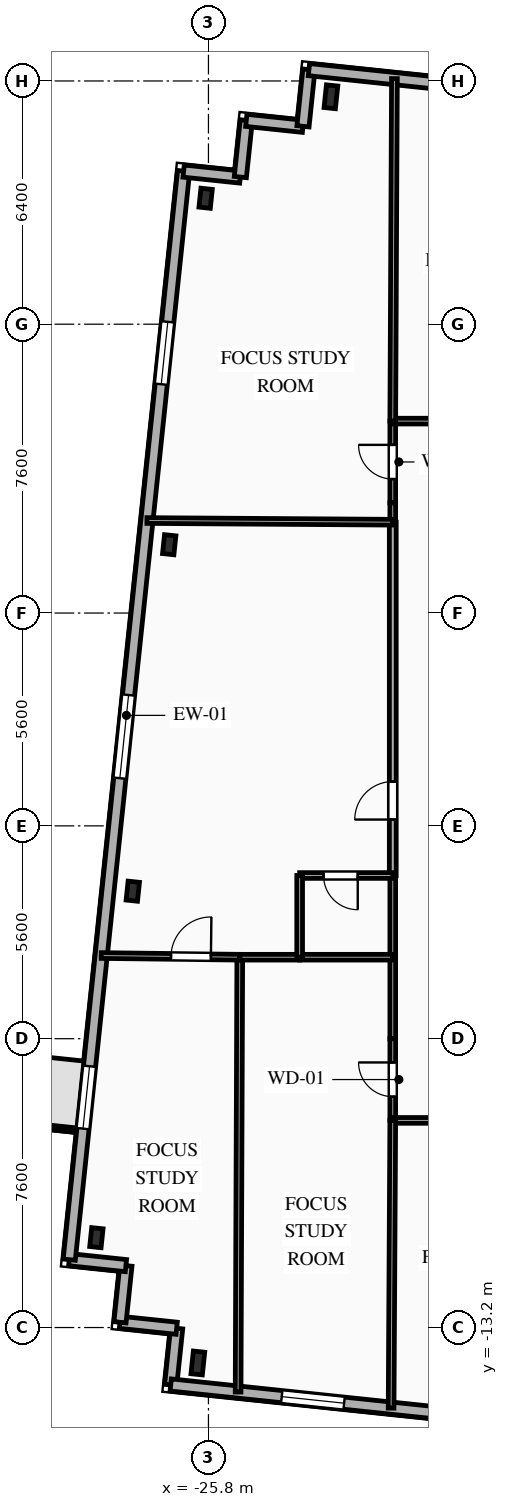
"""IFC4 building model, lengths in metres.
Left out: names, types, materials, properties, quantities, classifications, styles, units other than length and angle.
Written with IfcOpenShell. Run it as: python <this file> out.ifc"""

import sys

from ifc_helpers import new_model, si_unit, direction, frame, frame_2d, origin, origin_2d, place, context, subcontext, project, spatial, rectangle, i_section, extrude, element, fill, save


model = new_model("IFC4")
c1 = context("Model", 3, precision=1e-05, world=origin(), true_north=direction((0.0, 1.0)))
c2 = subcontext(c1, "Body", "Model", "MODEL_VIEW")
j1 = project(units=[si_unit("LENGTHUNIT", "METRE"), si_unit("PLANEANGLEUNIT", "RADIAN")], contexts=[c1])
p1 = place(None, origin())
s1 = spatial("IfcSite", under=j1, at=p1, CompositionType="ELEMENT")
p2 = place(p1, origin())
s2 = spatial("IfcBuilding", under=s1, at=p2, CompositionType="ELEMENT")
p3 = place(p2, frame((0.0, 0.0, 216.5)))
s3 = spatial("IfcBuildingStorey", under=s2, at=p3, CompositionType="ELEMENT", Elevation=216.5)
for number, where, z_axis, x_axis in (
    (1, (-26.079, -14.133, 0.0), (0.0, 0.0, 1.0), (0.995, -0.105, 0.0)),
    (2, (-22.577, 19.184, 0.0), (0.0, 0.0, 1.0), (0.995, -0.105, 0.0)),
):
    element("IfcColumn", number, at=place(p3, frame(where, z_axis=z_axis, x_axis=x_axis)), inside=s3, PredefinedType="COLUMN", context=c2, shape_type="SweptSolid", body=[
        extrude(i_section(OverallWidth=0.3, OverallDepth=0.6, WebThickness=0.015, FlangeThickness=0.03, FilletRadius=0.027, at=origin_2d()), origin(), (0.0, 0.0, 1.0), 3.35),
    ])
for number, where, z_axis, x_axis in (
    (3, (-25.875, 16.514, 0.0), (0.0, 0.0, 1.0), (0.995, -0.105, 0.0)),
    (4, (-26.833, 7.398, 0.0), (0.0, 0.0, 1.0), (0.995, -0.105, 0.0)),
    (5, (-27.791, -1.719, 0.0), (0.0, 0.0, 1.0), (0.995, -0.105, 0.0)),
    (6, (-28.749, -10.835, 0.0), (0.0, 0.0, 1.0), (0.995, -0.105, 0.0)),
):
    element("IfcColumn", number, at=place(p3, frame(where, z_axis=z_axis, x_axis=x_axis)), inside=s3, PredefinedType="COLUMN", context=c2, shape_type="SweptSolid", body=[
        extrude(i_section(OverallWidth=0.3, OverallDepth=0.5, WebThickness=0.014, FlangeThickness=0.028, FilletRadius=0.027, at=origin_2d()), origin(), (0.0, 0.0, 1.0), 3.35),
    ])
for number, where, z_axis, x_axis in (
    (7, (-26.793, -14.711, 0.0), (0.0, 0.0, 1.0), (0.104, 0.995, 0.0)),
    (8, (-26.637, -13.219, 0.0), (0.0, 0.0, 1.0), (-0.995, 0.104, 0.0)),
):
    element("IfcWall", number, at=place(p3, frame(where, z_axis=z_axis, x_axis=x_axis)), inside=s3, PredefinedType="SOLIDWALL", context=c2, shape_type="SweptSolid", body=[
        extrude(rectangle(XDim=1.5, YDim=0.32, at=frame_2d((0.75, 0.0))), origin(), (0.0, 0.0, 1.0), 3.04),
    ])
p4 = place(p3, frame((-28.128, -13.062, 0.0), z_axis=(0.0, 0.0, 1.0), x_axis=(0.104481464157, 0.994526834051, 0.0)))
e9 = element("IfcWall", 9, at=p4, inside=s3, PredefinedType="SOLIDWALL", context=c2, shape_type="SweptSolid", body=[
    extrude(rectangle(XDim=1.5, YDim=0.32, at=frame_2d((0.75, 0.0))), origin(), (0.0, 0.0, 1.0), 3.04),
])
p5 = place(p3, frame((-27.972, -11.571, 0.0), z_axis=(0.0, 0.0, 1.0), x_axis=(-0.994525057048, 0.104498377516, 0.0)))
e10 = element("IfcWall", 10, at=p5, inside=s3, PredefinedType="SOLIDWALL", context=c2, shape_type="SweptSolid", body=[
    extrude(rectangle(XDim=1.5, YDim=0.32, at=frame_2d((0.75, 0.0))), origin(), (0.0, 0.0, 1.0), 3.04),
])
p6 = place(p3, frame((-29.463, -11.414, 0.0), z_axis=(0.0, 0.0, 1.0), x_axis=(0.104530779244, 0.994521651947, 0.0)))
e11 = element("IfcWall", 11, at=p6, inside=s3, PredefinedType="SOLIDWALL", context=c2, shape_type="SweptSolid", body=[
    extrude(rectangle(XDim=28.8, YDim=0.32, at=frame_2d((14.4, 0.0))), origin(), (0.0, 0.0, 1.0), 3.04),
])
p7 = place(p6, frame((3.467, 0.0, 0.85)))
e12 = element("IfcOpeningElement", 12, at=p7, cuts=e11, PredefinedType="OPENING", context=c2, shape_type="SweptSolid", body=[
    extrude(rectangle(XDim=1.65, YDim=1.85, at=frame_2d((0.825, 0.925))), frame((0.0, 0.17, 0.0), z_axis=(0.0, -1.0, 0.0), x_axis=(1.0, 0.0, 0.0)), (0.0, 0.0, 1.0), 0.34),
])
p8 = place(p6, frame((12.738, 0.0, 0.85)))
e13 = element("IfcOpeningElement", 13, at=p8, cuts=e11, PredefinedType="OPENING", context=c2, shape_type="SweptSolid", body=[
    extrude(rectangle(XDim=2.2, YDim=1.85, at=frame_2d((1.1, 0.925))), frame((0.0, 0.17, 0.0), z_axis=(0.0, -1.0, 0.0), x_axis=(1.0, 0.0, 0.0)), (0.0, 0.0, 1.0), 0.34),
])
p9 = place(p6, frame((23.162, 0.0, 0.85)))
e14 = element("IfcOpeningElement", 14, at=p9, cuts=e11, PredefinedType="OPENING", context=c2, shape_type="SweptSolid", body=[
    extrude(rectangle(XDim=1.65, YDim=1.85, at=frame_2d((0.825, 0.925))), frame((0.0, 0.17, 0.0), z_axis=(0.0, -1.0, 0.0), x_axis=(1.0, 0.0, 0.0)), (0.0, 0.0, 1.0), 0.34),
])
p10 = place(p3, frame((-26.453, 17.229, 0.0), z_axis=(0.0, 0.0, 1.0), x_axis=(0.994508128223, -0.104659366031, 0.0)))
e15 = element("IfcWall", 15, at=p10, inside=s3, PredefinedType="SOLIDWALL", context=c2, shape_type="SweptSolid", body=[
    extrude(rectangle(XDim=1.5, YDim=0.32, at=frame_2d((0.75, 0.0))), origin(), (0.0, 0.0, 1.0), 3.04),
])
p11 = place(p3, frame((-24.961, 17.072, 0.0), z_axis=(0.0, 0.0, 1.0), x_axis=(0.104642427191, 0.994509910675, 0.0)))
e16 = element("IfcWall", 16, at=p11, inside=s3, PredefinedType="SOLIDWALL", context=c2, shape_type="SweptSolid", body=[
    extrude(rectangle(XDim=1.5, YDim=0.32, at=frame_2d((0.75, 0.0))), origin(), (0.0, 0.0, 1.0), 3.04),
])
p12 = place(p3, frame((-24.804, 18.563, 0.0), z_axis=(0.0, 0.0, 1.0), x_axis=(0.994508128223, -0.104659366031, 0.0)))
e17 = element("IfcWall", 17, at=p12, inside=s3, PredefinedType="SOLIDWALL", context=c2, shape_type="SweptSolid", body=[
    extrude(rectangle(XDim=1.5, YDim=0.32, at=frame_2d((0.75, 0.0))), origin(), (0.0, 0.0, 1.0), 3.04),
])
p13 = place(p3, frame((-23.312, 18.406, 0.0), z_axis=(0.0, 0.0, 1.0), x_axis=(0.104481464157, 0.994526834051, 0.0)))
e18 = element("IfcWall", 18, at=p13, inside=s3, PredefinedType="SOLIDWALL", context=c2, shape_type="SweptSolid", body=[
    extrude(rectangle(XDim=1.5, YDim=0.32, at=frame_2d((0.75, 0.0))), origin(), (0.0, 0.0, 1.0), 3.04),
])
p14 = place(p3, frame((-23.156, 19.898, 0.0), z_axis=(0.0, 0.0, 1.0), x_axis=(0.994522001802, -0.104527450613, 0.0)))
e19 = element("IfcWall", 19, at=p14, inside=s3, PredefinedType="SOLIDWALL", context=c2, shape_type="SweptSolid", body=[
    extrude(rectangle(XDim=45.8, YDim=0.32, at=frame_2d((22.9, 0.0))), origin(), (0.0, 0.0, 1.0), 3.04),
])
p15 = place(p14, frame((4.9, 0.0, 0.85)))
e20 = element("IfcOpeningElement", 20, at=p15, cuts=e19, PredefinedType="OPENING", context=c2, shape_type="SweptSolid", body=[
    extrude(rectangle(XDim=1.65, YDim=1.85, at=frame_2d((0.825, 0.925))), frame((0.0, 0.17, 0.0), z_axis=(0.0, -1.0, 0.0), x_axis=(1.0, 0.0, 0.0)), (0.0, 0.0, 1.0), 0.34),
])
p16 = place(p14, frame((11.706, 0.0, 0.85)))
e21 = element("IfcOpeningElement", 21, at=p16, cuts=e19, PredefinedType="OPENING", context=c2, shape_type="SweptSolid", body=[
    extrude(rectangle(XDim=1.65, YDim=1.85, at=frame_2d((0.825, 0.925))), frame((0.0, 0.17, 0.0), z_axis=(0.0, -1.0, 0.0), x_axis=(1.0, 0.0, 0.0)), (0.0, 0.0, 1.0), 0.34),
])
p17 = place(p14, frame((23.381, 0.0, 0.85)))
e22 = element("IfcOpeningElement", 22, at=p17, cuts=e19, PredefinedType="OPENING", context=c2, shape_type="SweptSolid", body=[
    extrude(rectangle(XDim=1.6, YDim=1.85, at=frame_2d((0.8, 0.925))), frame((0.0, 0.17, 0.0), z_axis=(0.0, -1.0, 0.0), x_axis=(1.0, 0.0, 0.0)), (0.0, 0.0, 1.0), 0.34),
])
p18 = place(p14, frame((34.628, 0.0, 0.85)))
e23 = element("IfcOpeningElement", 23, at=p18, cuts=e19, PredefinedType="OPENING", context=c2, shape_type="SweptSolid", body=[
    extrude(rectangle(XDim=1.65, YDim=1.85, at=frame_2d((0.825, 0.925))), frame((0.0, 0.17, 0.0), z_axis=(0.0, -1.0, 0.0), x_axis=(1.0, 0.0, 0.0)), (0.0, 0.0, 1.0), 0.34),
])
p19 = place(p3, frame((18.756, -19.498, 0.0), z_axis=(0.0, 0.0, 1.0), x_axis=(-0.994522060044, 0.104526896475, 0.0)))
e24 = element("IfcWall", 24, at=p19, inside=s3, PredefinedType="SOLIDWALL", context=c2, shape_type="SweptSolid", body=[
    extrude(rectangle(XDim=45.8, YDim=0.32, at=frame_2d((22.9, 0.0))), origin(), (0.0, 0.0, 1.0), 3.04),
])
p20 = place(p19, frame((1.657, 0.0, 0.85)))
e25 = element("IfcOpeningElement", 25, at=p20, cuts=e24, PredefinedType="OPENING", context=c2, shape_type="SweptSolid", body=[
    extrude(rectangle(XDim=1.65, YDim=1.85, at=frame_2d((0.825, 0.925))), frame((0.0, 0.17, 0.0), z_axis=(0.0, -1.0, 0.0), x_axis=(1.0, 0.0, 0.0)), (0.0, 0.0, 1.0), 0.34),
])
p21 = place(p19, frame((6.907, 0.0, 0.85)))
e26 = element("IfcOpeningElement", 26, at=p21, cuts=e24, PredefinedType="OPENING", context=c2, shape_type="SweptSolid", body=[
    extrude(rectangle(XDim=2.2, YDim=1.85, at=frame_2d((1.1, 0.925))), frame((0.0, 0.17, 0.0), z_axis=(0.0, -1.0, 0.0), x_axis=(1.0, 0.0, 0.0)), (0.0, 0.0, 1.0), 0.34),
])
p22 = place(p19, frame((13.953, 0.0, 0.85)))
e27 = element("IfcOpeningElement", 27, at=p22, cuts=e24, PredefinedType="OPENING", context=c2, shape_type="SweptSolid", body=[
    extrude(rectangle(XDim=2.2, YDim=1.85, at=frame_2d((1.1, 0.925))), frame((0.0, 0.17, 0.0), z_axis=(0.0, -1.0, 0.0), x_axis=(1.0, 0.0, 0.0)), (0.0, 0.0, 1.0), 0.34),
])
p23 = place(p19, frame((20.959, 0.0, 0.85)))
e28 = element("IfcOpeningElement", 28, at=p23, cuts=e24, PredefinedType="OPENING", context=c2, shape_type="SweptSolid", body=[
    extrude(rectangle(XDim=2.2, YDim=1.85, at=frame_2d((1.1, 0.925))), frame((0.0, 0.17, 0.0), z_axis=(0.0, -1.0, 0.0), x_axis=(1.0, 0.0, 0.0)), (0.0, 0.0, 1.0), 0.34),
])
p24 = place(p19, frame((27.965, 0.0, 0.85)))
e29 = element("IfcOpeningElement", 29, at=p24, cuts=e24, PredefinedType="OPENING", context=c2, shape_type="SweptSolid", body=[
    extrude(rectangle(XDim=2.2, YDim=1.85, at=frame_2d((1.1, 0.925))), frame((0.0, 0.17, 0.0), z_axis=(0.0, -1.0, 0.0), x_axis=(1.0, 0.0, 0.0)), (0.0, 0.0, 1.0), 0.34),
])
p25 = place(p19, frame((35.487, 0.0, 0.85)))
e30 = element("IfcOpeningElement", 30, at=p25, cuts=e24, PredefinedType="OPENING", context=c2, shape_type="SweptSolid", body=[
    extrude(rectangle(XDim=1.65, YDim=1.85, at=frame_2d((0.825, 0.925))), frame((0.0, 0.17, 0.0), z_axis=(0.0, -1.0, 0.0), x_axis=(1.0, 0.0, 0.0)), (0.0, 0.0, 1.0), 0.34),
])
p26 = place(p19, frame((41.212, 0.0, 0.85)))
e31 = element("IfcOpeningElement", 31, at=p26, cuts=e24, PredefinedType="OPENING", context=c2, shape_type="SweptSolid", body=[
    extrude(rectangle(XDim=1.65, YDim=1.85, at=frame_2d((0.825, 0.925))), frame((0.0, 0.17, 0.0), z_axis=(0.0, -1.0, 0.0), x_axis=(1.0, 0.0, 0.0)), (0.0, 0.0, 1.0), 0.34),
])
p27 = place(p3, frame((-20.95, 8.5, 0.0), z_axis=(0.0, 0.0, 1.0), x_axis=(0.0, 1.0, 0.0)))
e32 = element("IfcWall", 32, at=p27, inside=s3, PredefinedType="PARTITIONING", context=c2, shape_type="SweptSolid", body=[
    extrude(rectangle(XDim=2.15, YDim=0.15, at=frame_2d((1.075, 0.0))), origin(), (0.0, 0.0, 1.0), 3.04),
])
p28 = place(p27, frame((0.625, 0.0, 0.0)))
e33 = element("IfcOpeningElement", 33, at=p28, cuts=e32, PredefinedType="OPENING", context=c2, shape_type="SweptSolid", body=[
    extrude(rectangle(XDim=0.9, YDim=2.1, at=frame_2d((0.45, 1.05))), frame((0.0, 0.085, 0.0), z_axis=(0.0, -1.0, 0.0), x_axis=(1.0, 0.0, 0.0)), (0.0, 0.0, 1.0), 0.17),
])
p29 = place(p3, frame((-20.95, 10.65, 0.0), z_axis=(0.0, 0.0, 1.0), x_axis=(1.0, 0.0, 0.0)))
e34 = element("IfcWall", 34, at=p29, inside=s3, PredefinedType="PARTITIONING", context=c2, shape_type="SweptSolid", body=[
    extrude(rectangle(XDim=6.783, YDim=0.15, at=frame_2d((3.392, 0.0))), origin(), (0.0, 0.0, 1.0), 3.04),
])
p30 = place(p29, frame((4.582, 0.0, 0.0)))
e35 = element("IfcOpeningElement", 35, at=p30, cuts=e34, PredefinedType="OPENING", context=c2, shape_type="SweptSolid", body=[
    extrude(rectangle(XDim=1.05, YDim=2.15, at=frame_2d((0.525, 1.075))), frame((0.0, 0.085, 0.0), z_axis=(0.0, -1.0, 0.0), x_axis=(1.0, 0.0, 0.0)), (0.0, 0.0, 1.0), 0.17),
])
p31 = place(p3, frame((-20.95, -7.75, 0.0), z_axis=(0.0, 0.0, 1.0), x_axis=(0.0, 1.0, 0.0)))
e36 = element("IfcWall", 36, at=p31, inside=s3, PredefinedType="PARTITIONING", context=c2, shape_type="SweptSolid", body=[
    extrude(rectangle(XDim=2.15, YDim=0.15, at=frame_2d((1.075, 0.0))), origin(), (0.0, 0.0, 1.0), 3.04),
])
p32 = place(p31, frame((0.625, 0.0, 0.0)))
e37 = element("IfcOpeningElement", 37, at=p32, cuts=e36, PredefinedType="OPENING", context=c2, shape_type="SweptSolid", body=[
    extrude(rectangle(XDim=0.9, YDim=2.1, at=frame_2d((0.45, 1.05))), frame((0.0, 0.085, 0.0), z_axis=(0.0, -1.0, 0.0), x_axis=(1.0, 0.0, 0.0)), (0.0, 0.0, 1.0), 0.17),
])
p33 = place(p3, frame((-13.567, -7.75, 0.0), z_axis=(0.0, 0.0, 1.0), x_axis=(-1.0, 0.0, 0.0)))
e38 = element("IfcWall", 38, at=p33, inside=s3, PredefinedType="PARTITIONING", context=c2, shape_type="SweptSolid", body=[
    extrude(rectangle(XDim=7.383, YDim=0.15, at=frame_2d((3.691, 0.0))), origin(), (0.0, 0.0, 1.0), 3.04),
])
p34 = place(p33, frame((1.227, 0.0, 0.0)))
e39 = element("IfcOpeningElement", 39, at=p34, cuts=e38, PredefinedType="OPENING", context=c2, shape_type="SweptSolid", body=[
    extrude(rectangle(XDim=1.05, YDim=2.15, at=frame_2d((0.525, 1.075))), frame((0.0, 0.085, 0.0), z_axis=(0.0, -1.0, 0.0), x_axis=(1.0, 0.0, 0.0)), (0.0, 0.0, 1.0), 0.17),
])
p35 = place(p3, frame((-20.95, -5.6, 0.0), z_axis=(0.0, 0.0, 1.0), x_axis=(0.0, 1.0, 0.0)))
e40 = element("IfcWall", 40, at=p35, inside=s3, PredefinedType="PARTITIONING", context=c2, shape_type="SweptSolid", body=[
    extrude(rectangle(XDim=2.144, YDim=0.15, at=frame_2d((1.072, 0.0))), origin(), (0.0, 0.0, 1.0), 3.04),
])
p36 = place(p3, frame((-20.95, -1.306, 0.0), z_axis=(0.0, 0.0, 1.0), x_axis=(0.0, 1.0, 0.0)))
e41 = element("IfcWall", 41, at=p36, inside=s3, PredefinedType="PARTITIONING", context=c2, shape_type="SweptSolid", body=[
    extrude(rectangle(XDim=9.296, YDim=0.18, at=frame_2d((4.648, 0.0))), origin(), (0.0, 0.0, 1.0), 3.04),
])
p37 = place(p36, frame((1.472, 0.0, 0.0)))
e42 = element("IfcOpeningElement", 42, at=p37, cuts=e41, PredefinedType="OPENING", context=c2, shape_type="SweptSolid", body=[
    extrude(rectangle(XDim=1.0, YDim=2.15, at=frame_2d((0.5, 1.075))), frame((0.0, 0.1, 0.0), z_axis=(0.0, -1.0, 0.0), x_axis=(1.0, 0.0, 0.0)), (0.0, 0.0, 1.0), 0.2),
])
p38 = place(p3, frame((-20.95, -3.456, 0.0), z_axis=(0.0, 0.0, 1.0), x_axis=(0.0, 1.0, 0.0)))
e43 = element("IfcWall", 43, at=p38, inside=s3, PredefinedType="PLUMBINGWALL", context=c2, shape_type="SweptSolid", body=[
    extrude(rectangle(XDim=2.15, YDim=0.15, at=frame_2d((1.075, 0.0))), origin(), (0.0, 0.0, 1.0), 3.04),
])
p39 = place(p3, frame((-20.95, 7.99, 0.0), z_axis=(0.0, 0.0, 1.0), x_axis=(0.0, 1.0, 0.0)))
e44 = element("IfcWall", 44, at=p39, inside=s3, PredefinedType="PARTITIONING", context=c2, shape_type="SweptSolid", body=[
    extrude(rectangle(XDim=0.51, YDim=0.15, at=frame_2d((0.255, 0.0))), origin(), (0.0, 0.0, 1.0), 3.04),
])
p40 = place(p3, frame((-24.976, -3.456, 0.0), z_axis=(0.0, 0.0, 1.0), x_axis=(-0.003840873, -0.99999262382, 0.0)))
e45 = element("IfcWall", 45, at=p40, inside=s3, PredefinedType="PARTITIONING", context=c2, shape_type="SweptSolid", body=[
    extrude(rectangle(XDim=11.441, YDim=0.15, at=frame_2d((5.721, 0.0))), origin(), (0.0, 0.0, 1.0), 3.04),
])
p41 = place(p3, frame((-28.622, -3.412, 0.0), z_axis=(0.0, 0.0, 1.0), x_axis=(0.999927389555, -0.01205054433, 0.0)))
e46 = element("IfcWall", 46, at=p41, inside=s3, PredefinedType="PARTITIONING", context=c2, shape_type="SweptSolid", body=[
    extrude(rectangle(XDim=3.647, YDim=0.15, at=frame_2d((1.823, 0.0))), origin(), (0.0, 0.0, 1.0), 3.04),
])
p42 = place(p41, frame((1.837, 0.0, 0.0)))
e47 = element("IfcOpeningElement", 47, at=p42, cuts=e46, PredefinedType="OPENING", context=c2, shape_type="SweptSolid", body=[
    extrude(rectangle(XDim=1.05, YDim=2.15, at=frame_2d((0.525, 1.075))), frame((0.0, 0.085, 0.0), z_axis=(0.0, -1.0, 0.0), x_axis=(1.0, 0.0, 0.0)), (0.0, 0.0, 1.0), 0.17),
])
p43 = place(p3, frame((-24.976, -3.456, 0.0), z_axis=(0.0, 0.0, 1.0), x_axis=(1.0, 0.0, 0.0)))
e48 = element("IfcWall", 48, at=p43, inside=s3, PredefinedType="PARTITIONING", context=c2, shape_type="SweptSolid", body=[
    extrude(rectangle(XDim=1.576, YDim=0.15, at=frame_2d((0.788, 0.0))), origin(), (0.0, 0.0, 1.0), 3.04),
])
p44 = place(p3, frame((-23.4, -3.456, 0.0), z_axis=(0.0, 0.0, 1.0), x_axis=(1.0, 0.0, 0.0)))
e49 = element("IfcWall", 49, at=p44, inside=s3, PredefinedType="PLUMBINGWALL", context=c2, shape_type="SweptSolid", body=[
    extrude(rectangle(XDim=2.45, YDim=0.15, at=frame_2d((1.225, 0.0))), origin(), (0.0, 0.0, 1.0), 3.04),
])
p45 = place(p3, frame((-20.95, -7.75, 0.0), z_axis=(0.0, 0.0, 1.0), x_axis=(-0.005804668564, -0.99998315277, 0.0)))
e50 = element("IfcWall", 50, at=p45, inside=s3, PredefinedType="PARTITIONING", context=c2, shape_type="SweptSolid", body=[
    extrude(rectangle(XDim=7.571, YDim=0.15, at=frame_2d((3.785, 0.0))), origin(), (0.0, 0.0, 1.0), 3.04),
])
p46 = place(p3, frame((-20.95, -1.306, 0.0), z_axis=(0.0, 0.0, 1.0), x_axis=(-1.0, 0.0, 0.0)))
e51 = element("IfcWall", 51, at=p46, inside=s3, PredefinedType="PLUMBINGWALL", context=c2, shape_type="SweptSolid", body=[
    extrude(rectangle(XDim=2.45, YDim=0.15, at=frame_2d((1.225, 0.0))), origin(), (0.0, 0.0, 1.0), 3.04),
])
p47 = place(p46, frame((0.921, 0.0, 0.0)))
e52 = element("IfcOpeningElement", 52, at=p47, cuts=e51, PredefinedType="OPENING", context=c2, shape_type="SweptSolid", body=[
    extrude(rectangle(XDim=0.9, YDim=2.1, at=frame_2d((0.45, 1.05))), frame((0.0, 0.085, 0.0), z_axis=(0.0, -1.0, 0.0), x_axis=(1.0, 0.0, 0.0)), (0.0, 0.0, 1.0), 0.17),
])
p48 = place(p3, frame((-23.4, -1.306, 0.0), z_axis=(0.0, 0.0, 1.0), x_axis=(0.0, -1.0, 0.0)))
e53 = element("IfcWall", 53, at=p48, inside=s3, PredefinedType="PLUMBINGWALL", context=c2, shape_type="SweptSolid", body=[
    extrude(rectangle(XDim=2.15, YDim=0.15, at=frame_2d((1.075, 0.0))), origin(), (0.0, 0.0, 1.0), 2.695),
])
p49 = place(p3, frame((-27.419, 8.034, 0.0), z_axis=(0.0, 0.0, 1.0), x_axis=(0.999976928608, -0.006792808784, 0.0)))
e54 = element("IfcWall", 54, at=p49, inside=s3, PredefinedType="PARTITIONING", context=c2, shape_type="SweptSolid", body=[
    extrude(rectangle(XDim=6.469, YDim=0.15, at=frame_2d((3.235, 0.0))), origin(), (0.0, 0.0, 1.0), 3.04),
])
p50 = place(p3, frame((-20.906, 19.662, 0.0), z_axis=(0.0, 0.0, 1.0), x_axis=(-0.004876272857, -0.999988110911, 0.0)))
e55 = element("IfcWall", 55, at=p50, inside=s3, PredefinedType="PARTITIONING", context=c2, shape_type="SweptSolid", body=[
    extrude(rectangle(XDim=9.012, YDim=0.15, at=frame_2d((4.506, 0.0))), origin(), (0.0, 0.0, 1.0), 2.665),
])
p51 = place(p7, origin())
e56 = element("IfcWindow", 56, at=p51, inside=s3, PartitioningType="SINGLE_PANEL", PredefinedType="WINDOW", context=c2, shape_type="SweptSolid", body=[
    extrude(rectangle(XDim=1.65, YDim=1.85, at=frame_2d((0.825, 0.925))), frame((0.0, 0.03, 0.0), z_axis=(0.0, -1.0, 0.0), x_axis=(1.0, 0.0, 0.0)), (0.0, 0.0, 1.0), 0.06),
])
fill(e12, e56)
p52 = place(p8, origin())
e57 = element("IfcWindow", 57, at=p52, inside=s3, PartitioningType="SINGLE_PANEL", PredefinedType="WINDOW", context=c2, shape_type="SweptSolid", body=[
    extrude(rectangle(XDim=2.2, YDim=1.85, at=frame_2d((1.1, 0.925))), frame((0.0, 0.03, 0.0), z_axis=(0.0, -1.0, 0.0), x_axis=(1.0, 0.0, 0.0)), (0.0, 0.0, 1.0), 0.06),
])
fill(e13, e57)
p53 = place(p9, origin())
e58 = element("IfcWindow", 58, at=p53, inside=s3, PartitioningType="SINGLE_PANEL", PredefinedType="WINDOW", context=c2, shape_type="SweptSolid", body=[
    extrude(rectangle(XDim=1.65, YDim=1.85, at=frame_2d((0.825, 0.925))), frame((0.0, 0.03, 0.0), z_axis=(0.0, -1.0, 0.0), x_axis=(1.0, 0.0, 0.0)), (0.0, 0.0, 1.0), 0.06),
])
fill(e14, e58)
p54 = place(p26, origin())
e59 = element("IfcWindow", 59, at=p54, inside=s3, PartitioningType="SINGLE_PANEL", PredefinedType="WINDOW", context=c2, shape_type="SweptSolid", body=[
    extrude(rectangle(XDim=1.65, YDim=1.85, at=frame_2d((0.825, 0.925))), frame((0.0, 0.03, 0.0), z_axis=(0.0, -1.0, 0.0), x_axis=(1.0, 0.0, 0.0)), (0.0, 0.0, 1.0), 0.06),
])
fill(e31, e59)
p55 = place(p28, origin())
e60 = element("IfcDoor", 60, at=p55, inside=s3, OperationType="SINGLE_SWING_RIGHT", PredefinedType="DOOR", context=c2, shape_type="SweptSolid", body=[
    extrude(rectangle(XDim=0.9, YDim=2.1, at=frame_2d((0.45, 1.05))), frame((0.0, 0.025, 0.0), z_axis=(0.0, -1.0, 0.0), x_axis=(1.0, 0.0, 0.0)), (0.0, 0.0, 1.0), 0.05),
])
fill(e33, e60)
p56 = place(p32, origin())
e61 = element("IfcDoor", 61, at=p56, inside=s3, OperationType="SINGLE_SWING_RIGHT", PredefinedType="DOOR", context=c2, shape_type="SweptSolid", body=[
    extrude(rectangle(XDim=0.9, YDim=2.1, at=frame_2d((0.45, 1.05))), frame((0.0, 0.025, 0.0), z_axis=(0.0, -1.0, 0.0), x_axis=(1.0, 0.0, 0.0)), (0.0, 0.0, 1.0), 0.05),
])
fill(e37, e61)
p57 = place(p37, origin())
e62 = element("IfcDoor", 62, at=p57, inside=s3, OperationType="SINGLE_SWING_LEFT", PredefinedType="DOOR", context=c2, shape_type="SweptSolid", body=[
    extrude(rectangle(XDim=1.0, YDim=2.15, at=frame_2d((0.5, 1.075))), frame((0.0, 0.025, 0.0), z_axis=(0.0, -1.0, 0.0), x_axis=(1.0, 0.0, 0.0)), (0.0, 0.0, 1.0), 0.05),
])
fill(e42, e62)
p58 = place(p42, origin())
e63 = element("IfcDoor", 63, at=p58, inside=s3, OperationType="SINGLE_SWING_RIGHT", PredefinedType="DOOR", context=c2, shape_type="SweptSolid", body=[
    extrude(rectangle(XDim=1.05, YDim=2.15, at=frame_2d((0.525, 1.075))), frame((0.0, 0.025, 0.0), z_axis=(0.0, -1.0, 0.0), x_axis=(1.0, 0.0, 0.0)), (0.0, 0.0, 1.0), 0.05),
])
fill(e47, e63)
p59 = place(p47, origin())
e64 = element("IfcDoor", 64, at=p59, inside=s3, OperationType="SINGLE_SWING_LEFT", PredefinedType="DOOR", context=c2, shape_type="SweptSolid", body=[
    extrude(rectangle(XDim=0.9, YDim=2.1, at=frame_2d((0.45, 1.05))), frame((0.0, 0.025, 0.0), z_axis=(0.0, -1.0, 0.0), x_axis=(1.0, 0.0, 0.0)), (0.0, 0.0, 1.0), 0.05),
])
fill(e52, e64)
save(model, sys.argv[1])
